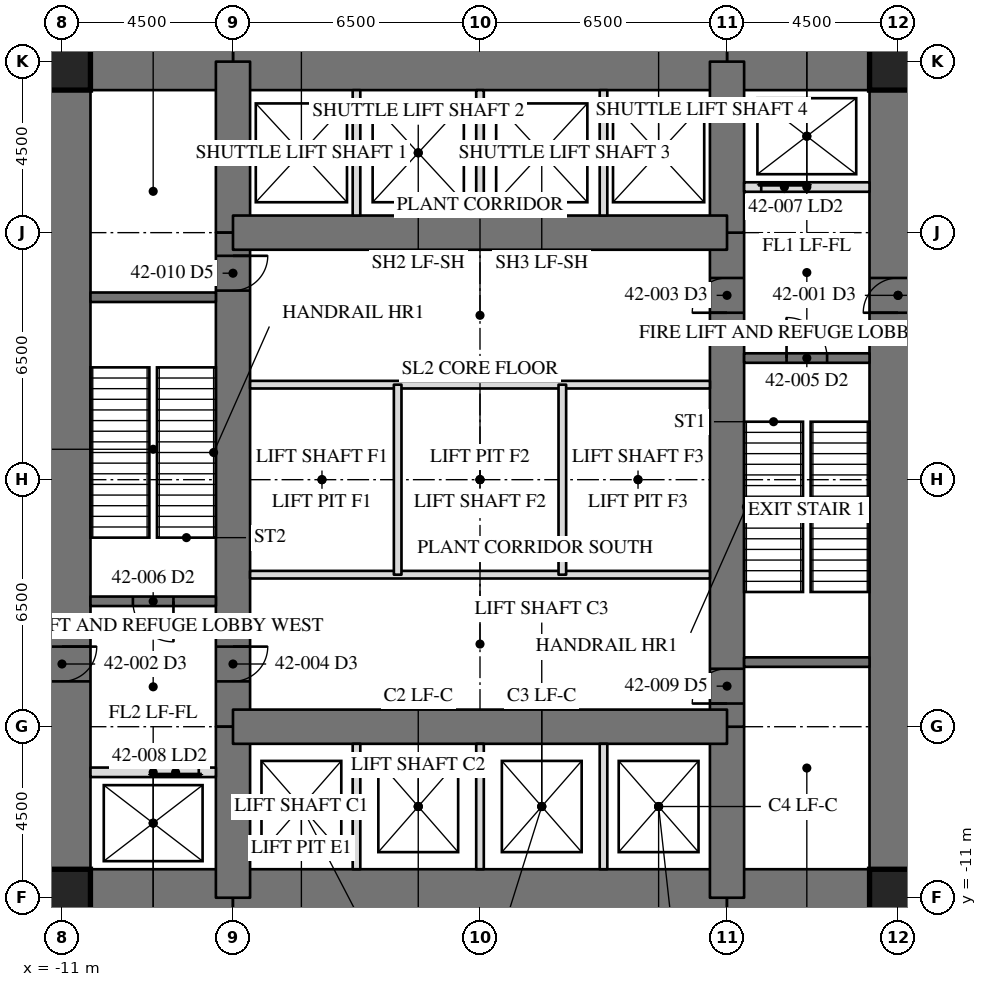
"""IFC4 building model, lengths in metres.
Left out: names, types, materials, properties, quantities, classifications, styles, units other than length and angle.
Written with IfcOpenShell. Run it as: python <this file> out.ifc"""

import sys

from ifc_helpers import new_model, si_unit, direction, frame, frame_2d, origin, origin_2d, place, context, subcontext, project, spatial, rectangle, hollow_rectangle, extrude, element, fill, save


model = new_model("IFC4")
c1 = context("Model", 3, precision=1e-05, world=origin(), true_north=direction((0.0, 1.0)))
c2 = subcontext(c1, "Body", "Model", "MODEL_VIEW")
j1 = project(units=[si_unit("LENGTHUNIT", "METRE"), si_unit("PLANEANGLEUNIT", "RADIAN")], contexts=[c1])
p1 = place(None, origin())
s1 = spatial("IfcSite", under=j1, at=p1, CompositionType="ELEMENT")
p2 = place(p1, origin())
s2 = spatial("IfcBuilding", under=s1, at=p2, CompositionType="ELEMENT")
p3 = place(p2, frame((0.0, 0.0, 178.7)))
s3 = spatial("IfcBuildingStorey", under=s2, at=p3, CompositionType="ELEMENT", Elevation=178.7)
p4 = place(p3, frame((11.0, -11.0, 0.0), z_axis=(0.0, 0.0, 1.0), x_axis=(0.0, 1.0, 0.0)))
e1 = element("IfcWall", 1, at=p4, inside=s3, PredefinedType="SHEAR", context=c2, shape_type="SweptSolid", body=[
    extrude(rectangle(XDim=22.0, YDim=1.5, at=frame_2d((11.0, 0.0))), origin(), (0.0, 0.0, 1.0), 6.0),
])
p5 = place(p4, frame((15.393, 0.0, 0.0)))
e2 = element("IfcOpeningElement", 2, at=p5, cuts=e1, PredefinedType="OPENING", context=c2, shape_type="SweptSolid", body=[
    extrude(rectangle(XDim=0.915, YDim=2.134, at=frame_2d((0.458, 1.067))), frame((0.0, 0.76, 0.0), z_axis=(0.0, -1.0, 0.0), x_axis=(1.0, 0.0, 0.0)), (0.0, 0.0, 1.0), 1.52),
])
p6 = place(p3, frame((-11.0, 11.0, 0.0), z_axis=(0.0, 0.0, 1.0), x_axis=(0.0, -1.0, 0.0)))
e3 = element("IfcWall", 3, at=p6, inside=s3, PredefinedType="SHEAR", context=c2, shape_type="SweptSolid", body=[
    extrude(rectangle(XDim=22.0, YDim=1.5, at=frame_2d((11.0, 0.0))), origin(), (0.0, 0.0, 1.0), 6.0),
])
p7 = place(p6, frame((15.393, 0.0, 0.0)))
e4 = element("IfcOpeningElement", 4, at=p7, cuts=e3, PredefinedType="OPENING", context=c2, shape_type="SweptSolid", body=[
    extrude(rectangle(XDim=0.915, YDim=2.134, at=frame_2d((0.458, 1.067))), frame((0.0, 0.76, 0.0), z_axis=(0.0, -1.0, 0.0), x_axis=(1.0, 0.0, 0.0)), (0.0, 0.0, 1.0), 1.52),
])
p8 = place(p3, frame((11.0, 11.0, 0.0), z_axis=(0.0, 0.0, 1.0), x_axis=(-1.0, 0.0, 0.0)))
e5 = element("IfcWall", 5, at=p8, inside=s3, PredefinedType="SHEAR", context=c2, shape_type="SweptSolid", body=[
    extrude(rectangle(XDim=4.5, YDim=1.5, at=frame_2d((2.25, 0.0))), origin(), (0.0, 0.0, 1.0), 6.0),
])
p9 = place(p3, frame((6.5, 11.0, 0.0), z_axis=(0.0, 0.0, 1.0), x_axis=(-1.0, 0.0, 0.0)))
e6 = element("IfcWall", 6, at=p9, inside=s3, PredefinedType="SHEAR", context=c2, shape_type="SweptSolid", body=[
    extrude(rectangle(XDim=13.0, YDim=1.5, at=frame_2d((6.5, 0.0))), origin(), (0.0, 0.0, 1.0), 6.0),
])
for number, where, z_axis, x_axis in (
    (7, (-6.5, 11.0, 0.0), (0.0, 0.0, 1.0), (-1.0, 0.0, 0.0)),
    (8, (-11.0, -11.0, 0.0), (0.0, 0.0, 1.0), (1.0, 0.0, 0.0)),
):
    element("IfcWall", number, at=place(p3, frame(where, z_axis=z_axis, x_axis=x_axis)), inside=s3, PredefinedType="SHEAR", context=c2, shape_type="SweptSolid", body=[
        extrude(rectangle(XDim=4.5, YDim=1.5, at=frame_2d((2.25, 0.0))), origin(), (0.0, 0.0, 1.0), 6.0),
    ])
p10 = place(p3, frame((-6.5, -11.0, 0.0), z_axis=(0.0, 0.0, 1.0), x_axis=(1.0, 0.0, 0.0)))
e9 = element("IfcWall", 9, at=p10, inside=s3, PredefinedType="SHEAR", context=c2, shape_type="SweptSolid", body=[
    extrude(rectangle(XDim=13.0, YDim=1.5, at=frame_2d((6.5, 0.0))), origin(), (0.0, 0.0, 1.0), 6.0),
])
p11 = place(p3, frame((6.5, -11.0, 0.0), z_axis=(0.0, 0.0, 1.0), x_axis=(1.0, 0.0, 0.0)))
e10 = element("IfcWall", 10, at=p11, inside=s3, PredefinedType="SHEAR", context=c2, shape_type="SweptSolid", body=[
    extrude(rectangle(XDim=4.5, YDim=1.5, at=frame_2d((2.25, 0.0))), origin(), (0.0, 0.0, 1.0), 6.0),
])
p12 = place(p3, frame((6.5, -11.0, 0.0), z_axis=(0.0, 0.0, 1.0), x_axis=(0.0, 1.0, 0.0)))
e11 = element("IfcWall", 11, at=p12, inside=s3, PredefinedType="SHEAR", context=c2, shape_type="SweptSolid", body=[
    extrude(rectangle(XDim=4.5, YDim=0.9, at=frame_2d((2.25, 0.0))), origin(), (0.0, 0.0, 1.0), 6.0),
])
p13 = place(p3, frame((6.5, -6.5, 0.0), z_axis=(0.0, 0.0, 1.0), x_axis=(0.0, 1.0, 0.0)))
e12 = element("IfcWall", 12, at=p13, inside=s3, PredefinedType="SHEAR", context=c2, shape_type="SweptSolid", body=[
    extrude(rectangle(XDim=13.0, YDim=0.9, at=frame_2d((6.5, 0.0))), origin(), (0.0, 0.0, 1.0), 6.0),
])
p14 = place(p13, frame((10.893, 0.0, 0.0)))
e13 = element("IfcOpeningElement", 13, at=p14, cuts=e12, PredefinedType="OPENING", context=c2, shape_type="SweptSolid", body=[
    extrude(rectangle(XDim=0.915, YDim=2.134, at=frame_2d((0.458, 1.067))), frame((0.0, 0.46, 0.0), z_axis=(0.0, -1.0, 0.0), x_axis=(1.0, 0.0, 0.0)), (0.0, 0.0, 1.0), 0.92),
])
p15 = place(p13, frame((0.61, 0.0, 0.0)))
e14 = element("IfcOpeningElement", 14, at=p15, cuts=e12, PredefinedType="OPENING", context=c2, shape_type="SweptSolid", body=[
    extrude(rectangle(XDim=0.915, YDim=2.134, at=frame_2d((0.458, 1.067))), frame((0.0, 0.46, 0.0), z_axis=(0.0, -1.0, 0.0), x_axis=(1.0, 0.0, 0.0)), (0.0, 0.0, 1.0), 0.92),
])
for number, where, z_axis, x_axis in (
    (15, (6.5, 6.5, 0.0), (0.0, 0.0, 1.0), (0.0, 1.0, 0.0)),
    (16, (-6.5, 11.0, 0.0), (0.0, 0.0, 1.0), (0.0, -1.0, 0.0)),
):
    element("IfcWall", number, at=place(p3, frame(where, z_axis=z_axis, x_axis=x_axis)), inside=s3, PredefinedType="SHEAR", context=c2, shape_type="SweptSolid", body=[
        extrude(rectangle(XDim=4.5, YDim=0.9, at=frame_2d((2.25, 0.0))), origin(), (0.0, 0.0, 1.0), 6.0),
    ])
p16 = place(p3, frame((-6.5, 6.5, 0.0), z_axis=(0.0, 0.0, 1.0), x_axis=(0.0, -1.0, 0.0)))
e17 = element("IfcWall", 17, at=p16, inside=s3, PredefinedType="SHEAR", context=c2, shape_type="SweptSolid", body=[
    extrude(rectangle(XDim=13.0, YDim=0.9, at=frame_2d((6.5, 0.0))), origin(), (0.0, 0.0, 1.0), 6.0),
])
p17 = place(p16, frame((10.893, 0.0, 0.0)))
e18 = element("IfcOpeningElement", 18, at=p17, cuts=e17, PredefinedType="OPENING", context=c2, shape_type="SweptSolid", body=[
    extrude(rectangle(XDim=0.915, YDim=2.134, at=frame_2d((0.458, 1.067))), frame((0.0, 0.46, 0.0), z_axis=(0.0, -1.0, 0.0), x_axis=(1.0, 0.0, 0.0)), (0.0, 0.0, 1.0), 0.92),
])
p18 = place(p16, frame((0.61, 0.0, 0.0)))
e19 = element("IfcOpeningElement", 19, at=p18, cuts=e17, PredefinedType="OPENING", context=c2, shape_type="SweptSolid", body=[
    extrude(rectangle(XDim=0.915, YDim=2.134, at=frame_2d((0.458, 1.067))), frame((0.0, 0.46, 0.0), z_axis=(0.0, -1.0, 0.0), x_axis=(1.0, 0.0, 0.0)), (0.0, 0.0, 1.0), 0.92),
])
p19 = place(p3, frame((-6.5, -6.5, 0.0), z_axis=(0.0, 0.0, 1.0), x_axis=(0.0, -1.0, 0.0)))
e20 = element("IfcWall", 20, at=p19, inside=s3, PredefinedType="SHEAR", context=c2, shape_type="SweptSolid", body=[
    extrude(rectangle(XDim=4.5, YDim=0.9, at=frame_2d((2.25, 0.0))), origin(), (0.0, 0.0, 1.0), 6.0),
])
for number, where, z_axis, x_axis in (
    (21, (6.5, 6.5, 0.0), (0.0, 0.0, 1.0), (-1.0, 0.0, 0.0)),
    (22, (-6.5, -6.5, 0.0), (0.0, 0.0, 1.0), (1.0, 0.0, 0.0)),
):
    element("IfcWall", number, at=place(p3, frame(where, z_axis=z_axis, x_axis=x_axis)), inside=s3, PredefinedType="SHEAR", context=c2, shape_type="SweptSolid", body=[
        extrude(rectangle(XDim=13.0, YDim=0.9, at=frame_2d((6.5, 0.0))), origin(), (0.0, 0.0, 1.0), 6.0),
    ])
for number, where, z_axis, x_axis in (
    (23, (11.0, 11.0, 0.0), (0.0, 0.0, 1.0), (1.0, 0.0, 0.0)),
    (24, (-11.0, 11.0, 0.0), (0.0, 0.0, 1.0), (1.0, 0.0, 0.0)),
    (25, (-11.0, -11.0, 0.0), (0.0, 0.0, 1.0), (1.0, 0.0, 0.0)),
    (26, (11.0, -11.0, 0.0), (0.0, 0.0, 1.0), (1.0, 0.0, 0.0)),
):
    element("IfcColumn", number, at=place(p3, frame(where, z_axis=z_axis, x_axis=x_axis)), inside=s3, PredefinedType="COLUMN", context=c2, shape_type="SweptSolid", body=[
        extrude(hollow_rectangle(XDim=1.499, YDim=1.499, WallThickness=0.102, at=origin_2d()), origin(), (0.0, 0.0, 1.0), 6.0),
    ])
for number, where, z_axis, x_axis in (
    (27, (6.95, -4.8, 0.0), (0.0, 0.0, 1.0), (1.0, 0.0, 0.0)),
    (28, (-6.95, 4.8, 0.0), (0.0, 0.0, 1.0), (-1.0, 0.0, 0.0)),
):
    element("IfcWall", number, at=place(p3, frame(where, z_axis=z_axis, x_axis=x_axis)), inside=s3, PredefinedType="SOLIDWALL", context=c2, shape_type="SweptSolid", body=[
        extrude(rectangle(XDim=3.3, YDim=0.25, at=frame_2d((1.65, 0.0))), origin(), (0.0, 0.0, 1.0), 5.81),
    ])
p20 = place(p3, frame((6.95, 3.2, 0.0), z_axis=(0.0, 0.0, 1.0), x_axis=(1.0, 0.0, 0.0)))
e29 = element("IfcWall", 29, at=p20, inside=s3, PredefinedType="SOLIDWALL", context=c2, shape_type="SweptSolid", body=[
    extrude(rectangle(XDim=3.3, YDim=0.25, at=frame_2d((1.65, 0.0))), origin(), (0.0, 0.0, 1.0), 5.81),
])
p21 = place(p20, frame((1.116, 0.0, 0.0)))
e30 = element("IfcOpeningElement", 30, at=p21, cuts=e29, PredefinedType="OPENING", context=c2, shape_type="SweptSolid", body=[
    extrude(rectangle(XDim=1.067, YDim=2.134, at=frame_2d((0.533, 1.067))), frame((0.0, 0.135, 0.0), z_axis=(0.0, -1.0, 0.0), x_axis=(1.0, 0.0, 0.0)), (0.0, 0.0, 1.0), 0.27),
])
p22 = place(p3, frame((-6.95, -3.2, 0.0), z_axis=(0.0, 0.0, 1.0), x_axis=(-1.0, 0.0, 0.0)))
e31 = element("IfcWall", 31, at=p22, inside=s3, PredefinedType="SOLIDWALL", context=c2, shape_type="SweptSolid", body=[
    extrude(rectangle(XDim=3.3, YDim=0.25, at=frame_2d((1.65, 0.0))), origin(), (0.0, 0.0, 1.0), 5.81),
])
p23 = place(p22, frame((1.116, 0.0, 0.0)))
e32 = element("IfcOpeningElement", 32, at=p23, cuts=e31, PredefinedType="OPENING", context=c2, shape_type="SweptSolid", body=[
    extrude(rectangle(XDim=1.067, YDim=2.134, at=frame_2d((0.533, 1.067))), frame((0.0, 0.135, 0.0), z_axis=(0.0, -1.0, 0.0), x_axis=(1.0, 0.0, 0.0)), (0.0, 0.0, 1.0), 0.27),
])
p24 = place(p3, frame((6.95, 7.7, 0.0), z_axis=(0.0, 0.0, 1.0), x_axis=(1.0, 0.0, 0.0)))
e33 = element("IfcWall", 33, at=p24, inside=s3, PredefinedType="PARTITIONING", context=c2, shape_type="SweptSolid", body=[
    extrude(rectangle(XDim=3.3, YDim=0.25, at=frame_2d((1.65, 0.0))), origin(), (0.0, 0.0, 1.0), 5.81),
])
p25 = place(p24, frame((0.45, 0.0, 0.0)))
e34 = element("IfcOpeningElement", 34, at=p25, cuts=e33, PredefinedType="OPENING", context=c2, shape_type="SweptSolid", body=[
    extrude(rectangle(XDim=1.219, YDim=2.134, at=frame_2d((0.609, 1.067))), frame((0.0, 0.135, 0.0), z_axis=(0.0, -1.0, 0.0), x_axis=(1.0, 0.0, 0.0)), (0.0, 0.0, 1.0), 0.27),
])
p26 = place(p3, frame((-6.95, -7.7, 0.0), z_axis=(0.0, 0.0, 1.0), x_axis=(-1.0, 0.0, 0.0)))
e35 = element("IfcWall", 35, at=p26, inside=s3, PredefinedType="PARTITIONING", context=c2, shape_type="SweptSolid", body=[
    extrude(rectangle(XDim=3.3, YDim=0.25, at=frame_2d((1.65, 0.0))), origin(), (0.0, 0.0, 1.0), 5.81),
])
p27 = place(p26, frame((0.45, 0.0, 0.0)))
e36 = element("IfcOpeningElement", 36, at=p27, cuts=e35, PredefinedType="OPENING", context=c2, shape_type="SweptSolid", body=[
    extrude(rectangle(XDim=1.219, YDim=2.134, at=frame_2d((0.609, 1.067))), frame((0.0, 0.135, 0.0), z_axis=(0.0, -1.0, 0.0), x_axis=(1.0, 0.0, 0.0)), (0.0, 0.0, 1.0), 0.27),
])
for number, where, z_axis, x_axis in (
    (37, (-6.05, 2.5, 0.0), (0.0, 0.0, 1.0), (1.0, 0.0, 0.0)),
    (38, (6.05, -2.5, 0.0), (0.0, 0.0, 1.0), (-1.0, 0.0, 0.0)),
):
    element("IfcWall", number, at=place(p3, frame(where, z_axis=z_axis, x_axis=x_axis)), inside=s3, PredefinedType="PARTITIONING", context=c2, shape_type="SweptSolid", body=[
        extrude(rectangle(XDim=12.1, YDim=0.2, at=frame_2d((6.05, 0.0))), origin(), (0.0, 0.0, 1.0), 5.81),
    ])
for number, where, z_axis, x_axis in (
    (39, (-3.25, 6.95, 0.0), (0.0, 0.0, 1.0), (0.0, 1.0, 0.0)),
    (40, (0.0, 6.95, 0.0), (0.0, 0.0, 1.0), (0.0, 1.0, 0.0)),
    (41, (3.25, 6.95, 0.0), (0.0, 0.0, 1.0), (0.0, 1.0, 0.0)),
    (42, (-3.25, -10.25, 0.0), (0.0, 0.0, 1.0), (0.0, 1.0, 0.0)),
    (43, (0.0, -10.25, 0.0), (0.0, 0.0, 1.0), (0.0, 1.0, 0.0)),
    (44, (3.25, -10.25, 0.0), (0.0, 0.0, 1.0), (0.0, 1.0, 0.0)),
):
    element("IfcWall", number, at=place(p3, frame(where, z_axis=z_axis, x_axis=x_axis)), inside=s3, PredefinedType="PARTITIONING", context=c2, shape_type="SweptSolid", body=[
        extrude(rectangle(XDim=3.3, YDim=0.2, at=frame_2d((1.65, 0.0))), origin(), (0.0, 0.0, 1.0), 5.81),
    ])
for number, where, z_axis, x_axis in (
    (45, (-2.167, -2.5, 0.0), (0.0, 0.0, 1.0), (0.0, 1.0, 0.0)),
    (46, (2.167, -2.5, 0.0), (0.0, 0.0, 1.0), (0.0, 1.0, 0.0)),
):
    element("IfcWall", number, at=place(p3, frame(where, z_axis=z_axis, x_axis=x_axis)), inside=s3, PredefinedType="PARTITIONING", context=c2, shape_type="SweptSolid", body=[
        extrude(rectangle(XDim=5.0, YDim=0.2, at=frame_2d((2.5, 0.0))), origin(), (0.0, 0.0, 1.0), 5.81),
    ])
p28 = place(p14, origin())
e47 = element("IfcDoor", 47, at=p28, inside=s3, OperationType="SINGLE_SWING_RIGHT", PredefinedType="DOOR", context=c2, shape_type="SweptSolid", body=[
    extrude(rectangle(XDim=0.915, YDim=2.134, at=frame_2d((0.458, 1.067))), frame((0.0, -0.375, 0.0), z_axis=(0.0, -1.0, 0.0), x_axis=(1.0, 0.0, 0.0)), (0.0, 0.0, 1.0), 0.05),
])
fill(e13, e47)
p29 = place(p17, origin())
e48 = element("IfcDoor", 48, at=p29, inside=s3, OperationType="SINGLE_SWING_RIGHT", PredefinedType="DOOR", context=c2, shape_type="SweptSolid", body=[
    extrude(rectangle(XDim=0.915, YDim=2.134, at=frame_2d((0.458, 1.067))), frame((0.0, -0.375, 0.0), z_axis=(0.0, -1.0, 0.0), x_axis=(1.0, 0.0, 0.0)), (0.0, 0.0, 1.0), 0.05),
])
fill(e18, e48)
p30 = place(p21, origin())
e49 = element("IfcDoor", 49, at=p30, inside=s3, OperationType="SINGLE_SWING_LEFT", PredefinedType="DOOR", context=c2, shape_type="SweptSolid", body=[
    extrude(rectangle(XDim=1.067, YDim=2.134, at=frame_2d((0.533, 1.067))), frame((0.0, 0.025, 0.0), z_axis=(0.0, -1.0, 0.0), x_axis=(1.0, 0.0, 0.0)), (0.0, 0.0, 1.0), 0.05),
])
fill(e30, e49)
p31 = place(p23, origin())
e50 = element("IfcDoor", 50, at=p31, inside=s3, OperationType="SINGLE_SWING_LEFT", PredefinedType="DOOR", context=c2, shape_type="SweptSolid", body=[
    extrude(rectangle(XDim=1.067, YDim=2.134, at=frame_2d((0.533, 1.067))), frame((0.0, 0.025, 0.0), z_axis=(0.0, -1.0, 0.0), x_axis=(1.0, 0.0, 0.0)), (0.0, 0.0, 1.0), 0.05),
])
fill(e32, e50)
p32 = place(p25, origin())
e51 = element("IfcDoor", 51, at=p32, inside=s3, OperationType="SLIDING_TO_LEFT", PredefinedType="DOOR", context=c2, shape_type="SweptSolid", body=[
    extrude(rectangle(XDim=1.219, YDim=2.134, at=frame_2d((0.609, 1.067))), frame((0.0, 0.025, 0.0), z_axis=(0.0, -1.0, 0.0), x_axis=(1.0, 0.0, 0.0)), (0.0, 0.0, 1.0), 0.05),
])
fill(e34, e51)
p33 = place(p27, origin())
e52 = element("IfcDoor", 52, at=p33, inside=s3, OperationType="SLIDING_TO_LEFT", PredefinedType="DOOR", context=c2, shape_type="SweptSolid", body=[
    extrude(rectangle(XDim=1.219, YDim=2.134, at=frame_2d((0.609, 1.067))), frame((0.0, 0.025, 0.0), z_axis=(0.0, -1.0, 0.0), x_axis=(1.0, 0.0, 0.0)), (0.0, 0.0, 1.0), 0.05),
])
fill(e36, e52)
p34 = place(p15, origin())
e53 = element("IfcDoor", 53, at=p34, inside=s3, OperationType="SINGLE_SWING_RIGHT", PredefinedType="DOOR", context=c2, shape_type="SweptSolid", body=[
    extrude(rectangle(XDim=0.915, YDim=2.134, at=frame_2d((0.458, 1.067))), frame((0.0, -0.375, 0.0), z_axis=(0.0, -1.0, 0.0), x_axis=(1.0, 0.0, 0.0)), (0.0, 0.0, 1.0), 0.05),
])
fill(e14, e53)
p35 = place(p18, origin())
e54 = element("IfcDoor", 54, at=p35, inside=s3, OperationType="SINGLE_SWING_RIGHT", PredefinedType="DOOR", context=c2, shape_type="SweptSolid", body=[
    extrude(rectangle(XDim=0.915, YDim=2.134, at=frame_2d((0.458, 1.067))), frame((0.0, -0.375, 0.0), z_axis=(0.0, -1.0, 0.0), x_axis=(1.0, 0.0, 0.0)), (0.0, 0.0, 1.0), 0.05),
])
fill(e19, e54)
save(model, sys.argv[1])
